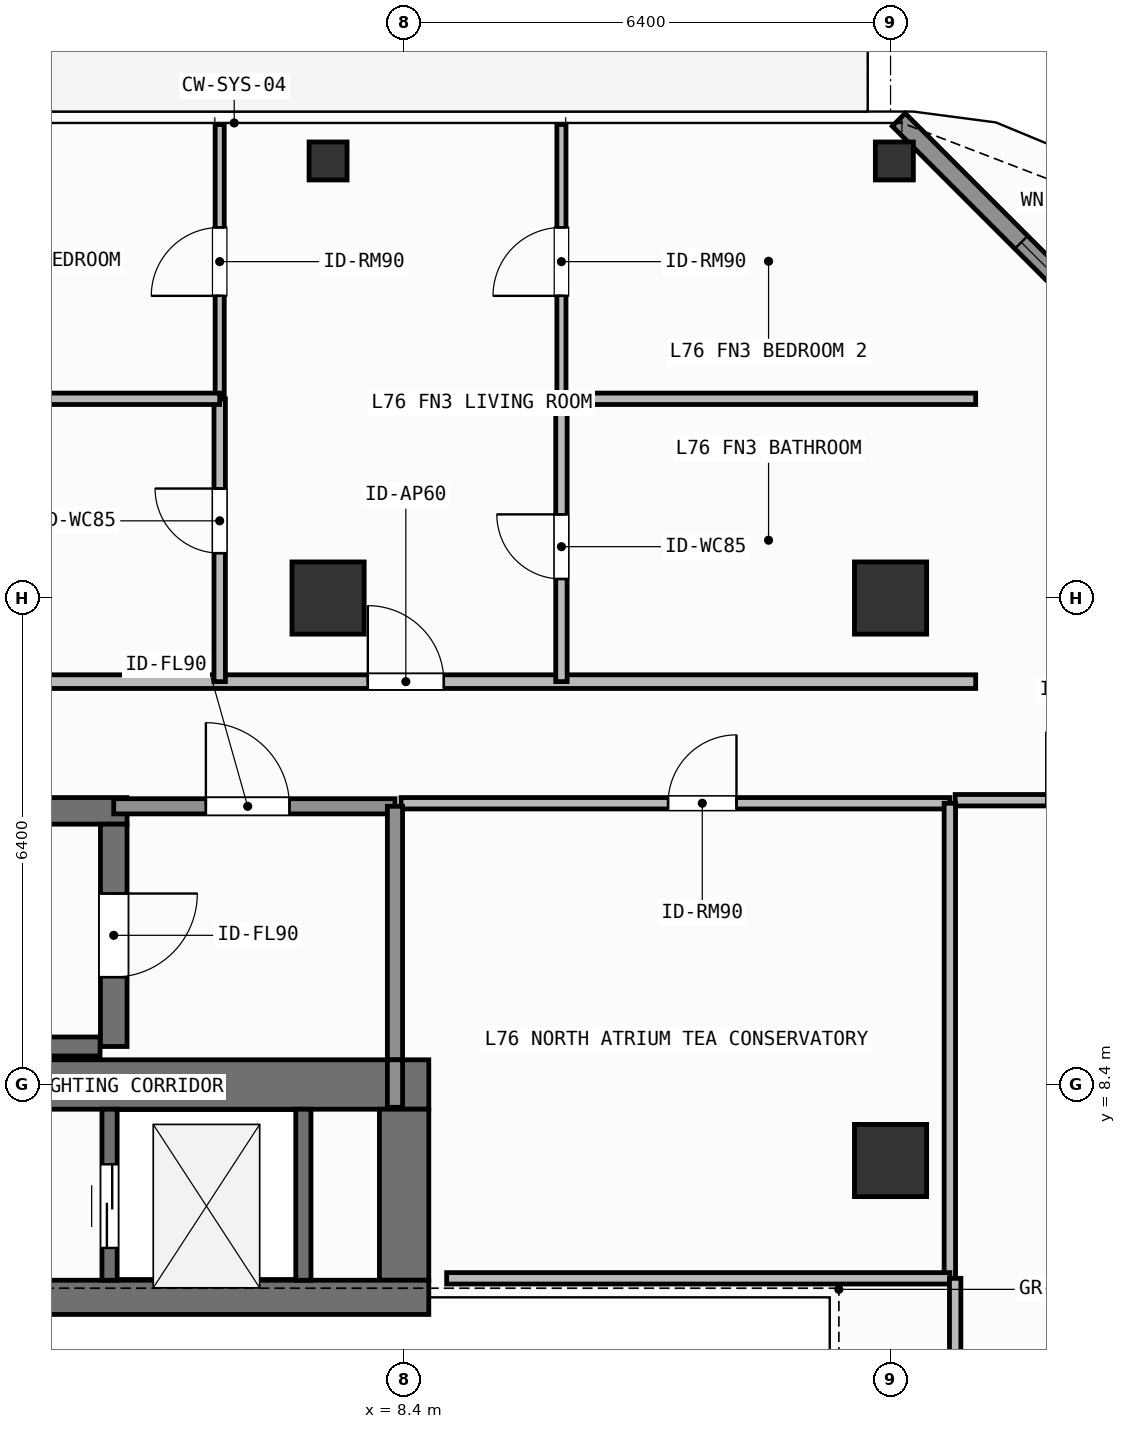
"""IFC4 building model, lengths in metres.
Left out: names, types, materials, properties, quantities, classifications, styles, units other than length and angle.
Written with IfcOpenShell. Run it as: python <this file> out.ifc"""

import sys

from ifc_helpers import new_model, si_unit, direction, frame, frame_2d, origin, origin_2d, place, context, subcontext, project, spatial, rectangle, hollow_rectangle, extrude, element, fill, save


model = new_model("IFC4")
c1 = context("Model", 3, precision=1e-05, world=origin(), true_north=direction((0.0, 1.0)))
c2 = subcontext(c1, "Body", "Model", "MODEL_VIEW")
j1 = project(units=[si_unit("LENGTHUNIT", "METRE"), si_unit("PLANEANGLEUNIT", "RADIAN")], contexts=[c1])
p1 = place(None, origin())
s1 = spatial("IfcSite", under=j1, at=p1, CompositionType="ELEMENT")
p2 = place(p1, origin())
s2 = spatial("IfcBuilding", under=s1, at=p2, CompositionType="ELEMENT")
p3 = place(p2, frame((0.0, 0.0, 309.3)))
s3 = spatial("IfcBuildingStorey", under=s2, at=p3, CompositionType="ELEMENT", Elevation=309.3)
p4 = place(p3, frame((-7.55, 8.4, 0.0), z_axis=(0.0, 0.0, 1.0), x_axis=(1.0, 0.0, 0.0)))
e1 = element("IfcWall", 1, at=p4, inside=s3, PredefinedType="SHEAR", context=c2, shape_type="SweptSolid", body=[
    extrude(rectangle(XDim=16.275, YDim=0.65, at=frame_2d((8.138, 0.0))), origin(), (0.0, 0.0, 1.0), 3.9),
])
p5 = place(p3, frame((8.4, 5.825, 0.0), z_axis=(0.0, 0.0, 1.0), x_axis=(0.0, 1.0, 0.0)))
e2 = element("IfcWall", 2, at=p5, inside=s3, PredefinedType="SHEAR", context=c2, shape_type="SweptSolid", body=[
    extrude(rectangle(XDim=2.25, YDim=0.65, at=frame_2d((1.125, 0.0))), origin(), (0.0, 0.0, 1.0), 3.9),
])
p6 = place(p3, frame((3.045, 5.6, 0.0), z_axis=(0.0, 0.0, 1.0), x_axis=(1.0, 0.0, 0.0)))
e3 = element("IfcWall", 3, at=p6, inside=s3, PredefinedType="SHEAR", context=c2, shape_type="SweptSolid", body=[
    extrude(rectangle(XDim=5.68, YDim=0.45, at=frame_2d((2.84, 0.0))), origin(), (0.0, 0.0, 1.0), 3.9),
])
p7 = place(p3, frame((-2.555, 12.0, 0.0), z_axis=(0.0, 0.0, 1.0), x_axis=(1.0, 0.0, 0.0)))
e4 = element("IfcWall", 4, at=p7, inside=s3, PredefinedType="SHEAR", context=c2, shape_type="SweptSolid", body=[
    extrude(rectangle(XDim=7.31, YDim=0.35, at=frame_2d((3.655, 0.0))), origin(), (0.0, 0.0, 1.0), 3.9),
])
p8 = place(p3, frame((-2.2, 8.9, 0.0), z_axis=(0.0, 0.0, 1.0), x_axis=(1.0, 0.0, 0.0)))
e5 = element("IfcWall", 5, at=p8, inside=s3, PredefinedType="SHEAR", context=c2, shape_type="SweptSolid", body=[
    extrude(rectangle(XDim=6.6, YDim=0.25, at=frame_2d((3.3, 0.0))), origin(), (0.0, 0.0, 1.0), 3.9),
])
p9 = place(p3, frame((4.58, 11.825, 0.0), z_axis=(0.0, 0.0, 1.0), x_axis=(0.0, -1.0, 0.0)))
e6 = element("IfcWall", 6, at=p9, inside=s3, PredefinedType="SHEAR", context=c2, shape_type="SweptSolid", body=[
    extrude(rectangle(XDim=2.925, YDim=0.35, at=frame_2d((1.462, 0.0))), origin(), (0.0, 0.0, 1.0), 3.9),
])
p10 = place(p9, frame((0.913, 0.0, 0.0)))
e7 = element("IfcOpeningElement", 7, at=p10, cuts=e6, PredefinedType="OPENING", context=c2, shape_type="SweptSolid", body=[
    extrude(rectangle(XDim=1.1, YDim=2.15, at=frame_2d((0.55, 1.075))), frame((0.0, 0.185, 0.0), z_axis=(0.0, -1.0, 0.0), x_axis=(1.0, 0.0, 0.0)), (0.0, 0.0, 1.0), 0.37),
])
for number, where, z_axis, x_axis in (
    (8, (7.4, 14.8, 0.0), (0.0, 0.0, 1.0), (1.0, 0.0, 0.0)),
    (9, (14.8, 14.8, 0.0), (0.0, 0.0, 1.0), (1.0, 0.0, 0.0)),
    (10, (14.8, 7.4, 0.0), (0.0, 0.0, 1.0), (1.0, 0.0, 0.0)),
):
    element("IfcColumn", number, at=place(p3, frame(where, z_axis=z_axis, x_axis=x_axis)), inside=s3, PredefinedType="COLUMN", context=c2, shape_type="SweptSolid", body=[
        extrude(rectangle(XDim=0.95, YDim=0.95, at=origin_2d()), origin(), (0.0, 0.0, 1.0), 3.9),
    ])
for number, where, z_axis, x_axis in (
    (11, (14.85, 20.55, 0.0), (0.0, 0.0, 1.0), (1.0, 0.0, 0.0)),
    (12, (7.4, 20.55, 0.0), (0.0, 0.0, 1.0), (1.0, 0.0, 0.0)),
):
    element("IfcColumn", number, at=place(p3, frame(where, z_axis=z_axis, x_axis=x_axis)), inside=s3, PredefinedType="COLUMN", context=c2, shape_type="SweptSolid", body=[
        extrude(hollow_rectangle(XDim=0.5, YDim=0.5, WallThickness=0.025, at=origin_2d()), origin(), (0.0, 0.0, 1.0), 3.9),
    ])
p11 = place(p3, frame((14.908, 21.092, 0.0), z_axis=(0.0, 0.0, 1.0), x_axis=(0.707106781187, -0.707106781187, 0.0)))
e13 = element("IfcWall", 13, at=p11, inside=s3, PredefinedType="SOLIDWALL", context=c2, shape_type="SweptSolid", body=[
    extrude(rectangle(XDim=6.059, YDim=0.24, at=frame_2d((3.03, 0.0))), origin(), (0.0, 0.0, 1.0), 3.64),
])
p12 = place(p11, frame((2.28, 0.0, 0.8)))
e14 = element("IfcOpeningElement", 14, at=p12, cuts=e13, PredefinedType="OPENING", context=c2, shape_type="SweptSolid", body=[
    extrude(rectangle(XDim=1.5, YDim=1.85, at=frame_2d((0.75, 0.925))), frame((0.0, 0.13, 0.0), z_axis=(0.0, -1.0, 0.0), x_axis=(1.0, 0.0, 0.0)), (0.0, 0.0, 1.0), 0.26),
])
p13 = place(p3, frame((4.525, 5.825, 0.0), z_axis=(0.0, 0.0, 1.0), x_axis=(0.0, 1.0, 0.0)))
e15 = element("IfcWall", 15, at=p13, inside=s3, PredefinedType="SHEAR", context=c2, shape_type="SweptSolid", body=[
    extrude(rectangle(XDim=2.25, YDim=0.2, at=frame_2d((1.125, 0.0))), origin(), (0.0, 0.0, 1.0), 3.64),
])
p14 = place(p13, frame((0.425, 0.0, 0.0)))
e16 = element("IfcOpeningElement", 16, at=p14, cuts=e15, PredefinedType="OPENING", context=c2, shape_type="SweptSolid", body=[
    extrude(rectangle(XDim=1.1, YDim=2.2, at=frame_2d((0.55, 1.1))), frame((0.0, 0.11, 0.0), z_axis=(0.0, -1.0, 0.0), x_axis=(1.0, 0.0, 0.0)), (0.0, 0.0, 1.0), 0.22),
])
p15 = place(p3, frame((7.075, 5.825, 0.0), z_axis=(0.0, 0.0, 1.0), x_axis=(0.0, 1.0, 0.0)))
e17 = element("IfcWall", 17, at=p15, inside=s3, PredefinedType="SHEAR", context=c2, shape_type="SweptSolid", body=[
    extrude(rectangle(XDim=2.25, YDim=0.2, at=frame_2d((1.125, 0.0))), origin(), (0.0, 0.0, 1.0), 3.64),
])
p16 = place(p3, frame((4.58, 12.06, 0.0), z_axis=(0.0, 0.0, 1.0), x_axis=(1.0, 0.0, 0.0)))
e18 = element("IfcWall", 18, at=p16, inside=s3, PredefinedType="SOLIDWALL", context=c2, shape_type="SweptSolid", body=[
    extrude(rectangle(XDim=3.7, YDim=0.2, at=frame_2d((1.85, 0.0))), origin(), (0.0, 0.0, 1.0), 3.64),
])
p17 = place(p16, frame((1.212, 0.0, 0.0)))
e19 = element("IfcOpeningElement", 19, at=p17, cuts=e18, PredefinedType="OPENING", context=c2, shape_type="SweptSolid", body=[
    extrude(rectangle(XDim=1.1, YDim=2.15, at=frame_2d((0.55, 1.075))), frame((0.0, 0.11, 0.0), z_axis=(0.0, -1.0, 0.0), x_axis=(1.0, 0.0, 0.0)), (0.0, 0.0, 1.0), 0.22),
])
p18 = place(p3, frame((8.36, 12.1, 0.0), z_axis=(0.0, 0.0, 1.0), x_axis=(1.0, 0.0, 0.0)))
e20 = element("IfcWall", 20, at=p18, inside=s3, PredefinedType="PARTITIONING", context=c2, shape_type="SweptSolid", body=[
    extrude(rectangle(XDim=7.22, YDim=0.15, at=frame_2d((3.61, 0.0))), origin(), (0.0, 0.0, 1.0), 3.64),
])
p19 = place(p18, frame((3.513, 0.0, 0.0)))
e21 = element("IfcOpeningElement", 21, at=p19, cuts=e20, PredefinedType="OPENING", context=c2, shape_type="SweptSolid", body=[
    extrude(rectangle(XDim=0.9, YDim=2.1, at=frame_2d((0.45, 1.05))), frame((0.0, 0.085, 0.0), z_axis=(0.0, -1.0, 0.0), x_axis=(1.0, 0.0, 0.0)), (0.0, 0.0, 1.0), 0.17),
])
p20 = place(p3, frame((2.905, 13.7, 0.0), z_axis=(0.0, 0.0, 1.0), x_axis=(1.0, 0.0, 0.0)))
e22 = element("IfcWall", 22, at=p20, inside=s3, PredefinedType="PARTITIONING", context=c2, shape_type="SweptSolid", body=[
    extrude(rectangle(XDim=13.015, YDim=0.18, at=frame_2d((6.507, 0.0))), origin(), (0.0, 0.0, 1.0), 3.64),
])
p21 = place(p20, frame((5.018, 0.0, 0.0)))
e23 = element("IfcOpeningElement", 23, at=p21, cuts=e22, PredefinedType="OPENING", context=c2, shape_type="SweptSolid", body=[
    extrude(rectangle(XDim=1.0, YDim=2.2, at=frame_2d((0.5, 1.1))), frame((0.0, 0.1, 0.0), z_axis=(0.0, -1.0, 0.0), x_axis=(1.0, 0.0, 0.0)), (0.0, 0.0, 1.0), 0.2),
])
p22 = place(p3, frame((5.974, 13.7, 0.0), z_axis=(0.0, 0.0, 1.0), x_axis=(0.0, 1.0, 0.0)))
e24 = element("IfcWall", 24, at=p22, inside=s3, PredefinedType="PARTITIONING", context=c2, shape_type="SweptSolid", body=[
    extrude(rectangle(XDim=3.721, YDim=0.15, at=frame_2d((1.86, 0.0))), origin(), (0.0, 0.0, 1.0), 3.64),
])
p23 = place(p22, frame((1.691, 0.0, 0.0)))
e25 = element("IfcOpeningElement", 25, at=p23, cuts=e24, PredefinedType="OPENING", context=c2, shape_type="SweptSolid", body=[
    extrude(rectangle(XDim=0.85, YDim=2.1, at=frame_2d((0.425, 1.05))), frame((0.0, 0.085, 0.0), z_axis=(0.0, -1.0, 0.0), x_axis=(1.0, 0.0, 0.0)), (0.0, 0.0, 1.0), 0.17),
])
p24 = place(p3, frame((5.974, 17.421, 0.0), z_axis=(0.0, 0.0, 1.0), x_axis=(0.0, 1.0, 0.0)))
e26 = element("IfcWall", 26, at=p24, inside=s3, PredefinedType="PARTITIONING", context=c2, shape_type="SweptSolid", body=[
    extrude(rectangle(XDim=3.609, YDim=0.12, at=frame_2d((1.805, 0.0))), origin(), (0.0, 0.0, 1.0), 3.64),
])
p25 = place(p24, frame((1.354, 0.0, 0.0)))
e27 = element("IfcOpeningElement", 27, at=p25, cuts=e26, PredefinedType="OPENING", context=c2, shape_type="SweptSolid", body=[
    extrude(rectangle(XDim=0.9, YDim=2.1, at=frame_2d((0.45, 1.05))), frame((0.0, 0.07, 0.0), z_axis=(0.0, -1.0, 0.0), x_axis=(1.0, 0.0, 0.0)), (0.0, 0.0, 1.0), 0.14),
])
p26 = place(p3, frame((10.47, 13.7, 0.0), z_axis=(0.0, 0.0, 1.0), x_axis=(0.0, 1.0, 0.0)))
e28 = element("IfcWall", 28, at=p26, inside=s3, PredefinedType="PARTITIONING", context=c2, shape_type="SweptSolid", body=[
    extrude(rectangle(XDim=3.721, YDim=0.15, at=frame_2d((1.86, 0.0))), origin(), (0.0, 0.0, 1.0), 3.64),
])
p27 = place(p26, frame((1.351, 0.0, 0.0)))
e29 = element("IfcOpeningElement", 29, at=p27, cuts=e28, PredefinedType="OPENING", context=c2, shape_type="SweptSolid", body=[
    extrude(rectangle(XDim=0.85, YDim=2.1, at=frame_2d((0.425, 1.05))), frame((0.0, 0.085, 0.0), z_axis=(0.0, -1.0, 0.0), x_axis=(1.0, 0.0, 0.0)), (0.0, 0.0, 1.0), 0.17),
])
p28 = place(p3, frame((10.47, 17.421, 0.0), z_axis=(0.0, 0.0, 1.0), x_axis=(0.0, 1.0, 0.0)))
e30 = element("IfcWall", 30, at=p28, inside=s3, PredefinedType="PARTITIONING", context=c2, shape_type="SweptSolid", body=[
    extrude(rectangle(XDim=3.609, YDim=0.12, at=frame_2d((1.805, 0.0))), origin(), (0.0, 0.0, 1.0), 3.64),
])
p29 = place(p28, frame((1.354, 0.0, 0.0)))
e31 = element("IfcOpeningElement", 31, at=p29, cuts=e30, PredefinedType="OPENING", context=c2, shape_type="SweptSolid", body=[
    extrude(rectangle(XDim=0.9, YDim=2.1, at=frame_2d((0.45, 1.05))), frame((0.0, 0.07, 0.0), z_axis=(0.0, -1.0, 0.0), x_axis=(1.0, 0.0, 0.0)), (0.0, 0.0, 1.0), 0.14),
])
p30 = place(p3, frame((15.65, 12.14, 0.0), z_axis=(0.0, 0.0, 1.0), x_axis=(1.0, 0.0, 0.0)))
e32 = element("IfcWall", 32, at=p30, inside=s3, PredefinedType="PARTITIONING", context=c2, shape_type="SweptSolid", body=[
    extrude(rectangle(XDim=3.47, YDim=0.15, at=frame_2d((1.735, 0.0))), origin(), (0.0, 0.0, 1.0), 3.64),
])
p31 = place(p30, frame((1.198, 0.0, 0.0)))
e33 = element("IfcOpeningElement", 33, at=p31, cuts=e32, PredefinedType="OPENING", context=c2, shape_type="SweptSolid", body=[
    extrude(rectangle(XDim=0.9, YDim=2.1, at=frame_2d((0.45, 1.05))), frame((0.0, 0.085, 0.0), z_axis=(0.0, -1.0, 0.0), x_axis=(1.0, 0.0, 0.0)), (0.0, 0.0, 1.0), 0.17),
])
p32 = place(p3, frame((8.28, 8.725, 0.0), z_axis=(0.0, 0.0, 1.0), x_axis=(0.0, 1.0, 0.0)))
e34 = element("IfcWall", 34, at=p32, inside=s3, PredefinedType="SOLIDWALL", context=c2, shape_type="SweptSolid", body=[
    extrude(rectangle(XDim=3.335, YDim=0.2, at=frame_2d((1.667, 0.0))), origin(), (0.0, 0.0, 1.0), 3.64),
])
p33 = place(p3, frame((8.28, 8.1, 0.0), z_axis=(0.0, 0.0, 1.0), x_axis=(0.0, 1.0, 0.0)))
e35 = element("IfcWall", 35, at=p33, inside=s3, PredefinedType="SOLIDWALL", context=c2, shape_type="SweptSolid", body=[
    extrude(rectangle(XDim=0.625, YDim=0.2, at=frame_2d((0.312, 0.0))), origin(), (0.0, 0.0, 1.0), 3.64),
])
p34 = place(p3, frame((15.58, 5.85, 0.0), z_axis=(0.0, 0.0, 1.0), x_axis=(0.0, 1.0, 0.0)))
e36 = element("IfcWall", 36, at=p34, inside=s3, PredefinedType="PARTITIONING", context=c2, shape_type="SweptSolid", body=[
    extrude(rectangle(XDim=6.25, YDim=0.15, at=frame_2d((3.125, 0.0))), origin(), (0.0, 0.0, 1.0), 3.33),
])
p35 = place(p3, frame((8.96, 5.85, 0.0), z_axis=(0.0, 0.0, 1.0), x_axis=(1.0, 0.0, 0.0)))
e37 = element("IfcWall", 37, at=p35, inside=s3, PredefinedType="PARTITIONING", context=c2, shape_type="SweptSolid", body=[
    extrude(rectangle(XDim=6.62, YDim=0.15, at=frame_2d((3.31, 0.0))), origin(), (0.0, 0.0, 1.0), 3.64),
])
p36 = place(p3, frame((2.905, 17.421, 0.0), z_axis=(0.0, 0.0, 1.0), x_axis=(1.0, 0.0, 0.0)))
e38 = element("IfcWall", 38, at=p36, inside=s3, PredefinedType="PARTITIONING", context=c2, shape_type="SweptSolid", body=[
    extrude(rectangle(XDim=3.069, YDim=0.15, at=frame_2d((1.535, 0.0))), origin(), (0.0, 0.0, 1.0), 3.33),
])
p37 = place(p3, frame((10.47, 17.421, 0.0), z_axis=(0.0, 0.0, 1.0), x_axis=(1.0, 0.0, 0.0)))
e39 = element("IfcWall", 39, at=p37, inside=s3, PredefinedType="PARTITIONING", context=c2, shape_type="SweptSolid", body=[
    extrude(rectangle(XDim=5.45, YDim=0.15, at=frame_2d((2.725, 0.0))), origin(), (0.0, 0.0, 1.0), 3.33),
])
p38 = place(p3, frame((15.65, -2.75, 0.0), z_axis=(0.0, 0.0, 1.0), x_axis=(0.0, 1.0, 0.0)))
e40 = element("IfcWall", 40, at=p38, inside=s3, PredefinedType="PARTITIONING", context=c2, shape_type="SweptSolid", body=[
    extrude(rectangle(XDim=8.6, YDim=0.15, at=frame_2d((4.3, 0.0))), origin(), (0.0, 0.0, 1.0), 3.33),
])
p39 = place(p12, origin())
e41 = element("IfcWindow", 41, at=p39, inside=s3, PartitioningType="SINGLE_PANEL", PredefinedType="WINDOW", context=c2, shape_type="SweptSolid", body=[
    extrude(rectangle(XDim=1.5, YDim=1.85, at=frame_2d((0.75, 0.925))), frame((0.0, 0.03, 0.0), z_axis=(0.0, -1.0, 0.0), x_axis=(1.0, 0.0, 0.0)), (0.0, 0.0, 1.0), 0.06),
])
fill(e14, e41)
p40 = place(p14, origin())
e42 = element("IfcDoor", 42, at=p40, inside=s3, OperationType="SLIDING_TO_LEFT", PredefinedType="DOOR", context=c2, shape_type="SweptSolid", body=[
    extrude(rectangle(XDim=1.1, YDim=2.2, at=frame_2d((0.55, 1.1))), frame((0.0, 0.025, 0.0), z_axis=(0.0, -1.0, 0.0), x_axis=(1.0, 0.0, 0.0)), (0.0, 0.0, 1.0), 0.05),
])
fill(e16, e42)
p41 = place(p10, origin())
e43 = element("IfcDoor", 43, at=p41, inside=s3, OperationType="SINGLE_SWING_LEFT", PredefinedType="DOOR", context=c2, shape_type="SweptSolid", body=[
    extrude(rectangle(XDim=1.1, YDim=2.15, at=frame_2d((0.55, 1.075))), frame((0.0, 0.025, 0.0), z_axis=(0.0, -1.0, 0.0), x_axis=(1.0, 0.0, 0.0)), (0.0, 0.0, 1.0), 0.05),
])
fill(e7, e43)
p42 = place(p17, origin())
e44 = element("IfcDoor", 44, at=p42, inside=s3, OperationType="SINGLE_SWING_LEFT", PredefinedType="DOOR", context=c2, shape_type="SweptSolid", body=[
    extrude(rectangle(XDim=1.1, YDim=2.15, at=frame_2d((0.55, 1.075))), frame((0.0, 0.025, 0.0), z_axis=(0.0, -1.0, 0.0), x_axis=(1.0, 0.0, 0.0)), (0.0, 0.0, 1.0), 0.05),
])
fill(e19, e44)
p43 = place(p19, origin())
e45 = element("IfcDoor", 45, at=p43, inside=s3, OperationType="SINGLE_SWING_RIGHT", PredefinedType="DOOR", context=c2, shape_type="SweptSolid", body=[
    extrude(rectangle(XDim=0.9, YDim=2.1, at=frame_2d((0.45, 1.05))), frame((0.0, 0.025, 0.0), z_axis=(0.0, -1.0, 0.0), x_axis=(1.0, 0.0, 0.0)), (0.0, 0.0, 1.0), 0.05),
])
fill(e21, e45)
p44 = place(p21, origin())
e46 = element("IfcDoor", 46, at=p44, inside=s3, OperationType="SINGLE_SWING_LEFT", PredefinedType="DOOR", context=c2, shape_type="SweptSolid", body=[
    extrude(rectangle(XDim=1.0, YDim=2.2, at=frame_2d((0.5, 1.1))), frame((0.0, 0.025, 0.0), z_axis=(0.0, -1.0, 0.0), x_axis=(1.0, 0.0, 0.0)), (0.0, 0.0, 1.0), 0.05),
])
fill(e23, e46)
p45 = place(p23, origin())
e47 = element("IfcDoor", 47, at=p45, inside=s3, OperationType="SINGLE_SWING_RIGHT", PredefinedType="DOOR", context=c2, shape_type="SweptSolid", body=[
    extrude(rectangle(XDim=0.85, YDim=2.1, at=frame_2d((0.425, 1.05))), frame((0.0, 0.025, 0.0), z_axis=(0.0, -1.0, 0.0), x_axis=(1.0, 0.0, 0.0)), (0.0, 0.0, 1.0), 0.05),
])
fill(e25, e47)
p46 = place(p25, origin())
e48 = element("IfcDoor", 48, at=p46, inside=s3, OperationType="SINGLE_SWING_LEFT", PredefinedType="DOOR", context=c2, shape_type="SweptSolid", body=[
    extrude(rectangle(XDim=0.9, YDim=2.1, at=frame_2d((0.45, 1.05))), frame((0.0, 0.025, 0.0), z_axis=(0.0, -1.0, 0.0), x_axis=(1.0, 0.0, 0.0)), (0.0, 0.0, 1.0), 0.05),
])
fill(e27, e48)
p47 = place(p27, origin())
e49 = element("IfcDoor", 49, at=p47, inside=s3, OperationType="SINGLE_SWING_RIGHT", PredefinedType="DOOR", context=c2, shape_type="SweptSolid", body=[
    extrude(rectangle(XDim=0.85, YDim=2.1, at=frame_2d((0.425, 1.05))), frame((0.0, 0.025, 0.0), z_axis=(0.0, -1.0, 0.0), x_axis=(1.0, 0.0, 0.0)), (0.0, 0.0, 1.0), 0.05),
])
fill(e29, e49)
p48 = place(p29, origin())
e50 = element("IfcDoor", 50, at=p48, inside=s3, OperationType="SINGLE_SWING_LEFT", PredefinedType="DOOR", context=c2, shape_type="SweptSolid", body=[
    extrude(rectangle(XDim=0.9, YDim=2.1, at=frame_2d((0.45, 1.05))), frame((0.0, 0.025, 0.0), z_axis=(0.0, -1.0, 0.0), x_axis=(1.0, 0.0, 0.0)), (0.0, 0.0, 1.0), 0.05),
])
fill(e31, e50)
p49 = place(p31, origin())
e51 = element("IfcDoor", 51, at=p49, inside=s3, OperationType="SINGLE_SWING_LEFT", PredefinedType="DOOR", context=c2, shape_type="SweptSolid", body=[
    extrude(rectangle(XDim=0.9, YDim=2.1, at=frame_2d((0.45, 1.05))), frame((0.0, 0.025, 0.0), z_axis=(0.0, -1.0, 0.0), x_axis=(1.0, 0.0, 0.0)), (0.0, 0.0, 1.0), 0.05),
])
fill(e33, e51)
save(model, sys.argv[1])
